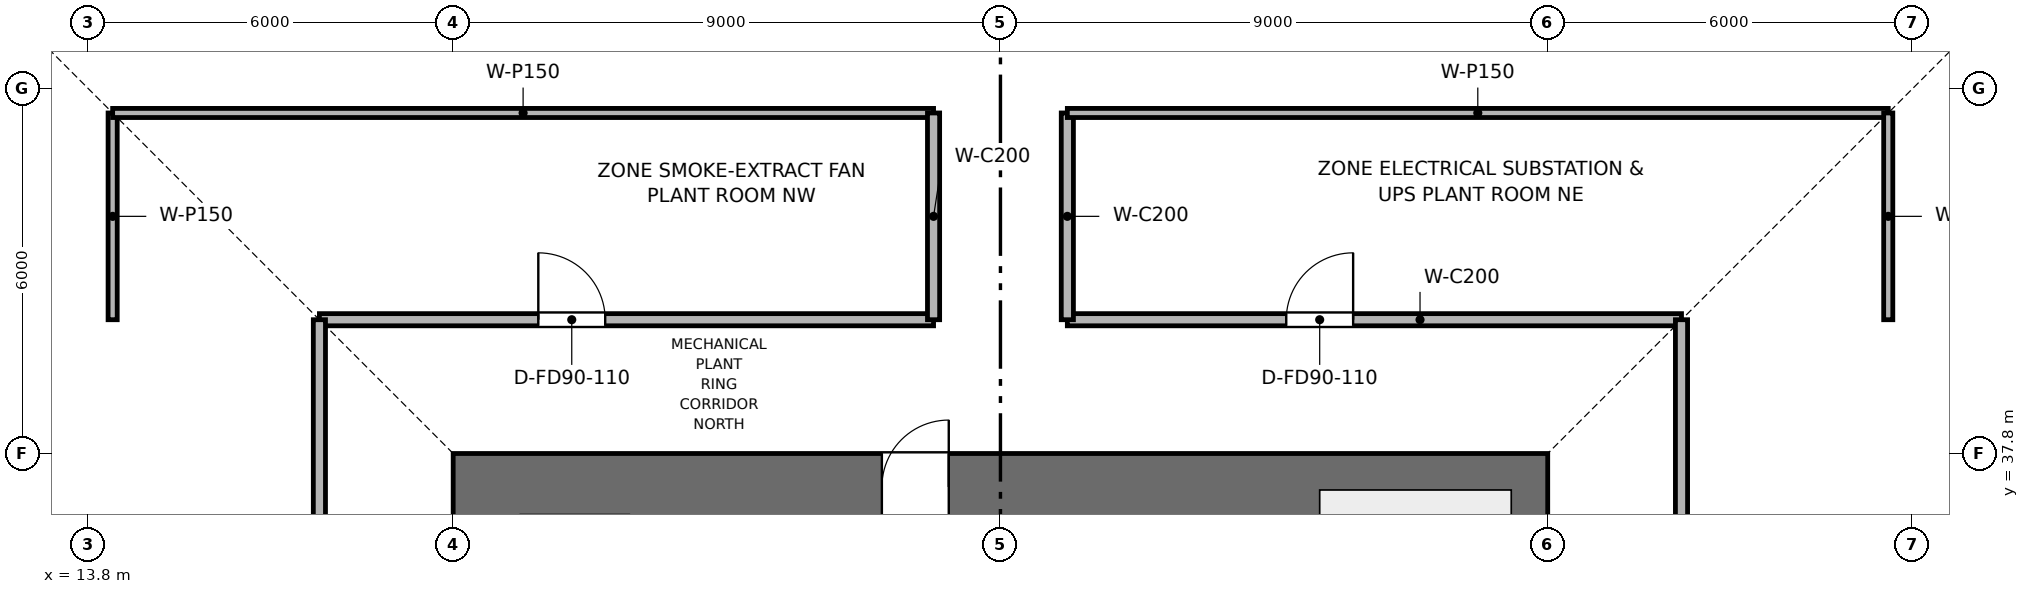
"""IFC4 building model, lengths in metres.
Left out: names, types, materials, properties, quantities, classifications, styles, units other than length and angle.
Written with IfcOpenShell. Run it as: python <this file> out.ifc"""

import sys

from ifc_helpers import new_model, si_unit, direction, frame, frame_2d, origin, place, context, subcontext, project, spatial, rectangle, extrude, element, fill, save


model = new_model("IFC4")
c1 = context("Model", 3, precision=1e-05, world=origin(), true_north=direction((0.0, 1.0)))
c2 = subcontext(c1, "Body", "Model", "MODEL_VIEW")
j1 = project(units=[si_unit("LENGTHUNIT", "METRE"), si_unit("PLANEANGLEUNIT", "RADIAN")], contexts=[c1])
p1 = place(None, origin())
s1 = spatial("IfcSite", under=j1, at=p1, CompositionType="ELEMENT")
p2 = place(p1, origin())
s2 = spatial("IfcBuilding", under=s1, at=p2, CompositionType="ELEMENT")
p3 = place(p2, frame((0.0, 0.0, 24.0)))
s3 = spatial("IfcBuildingStorey", under=s2, at=p3, CompositionType="ELEMENT", Elevation=24.0)
p4 = place(p3, frame((19.8, 37.25, 0.0), z_axis=(0.0, 0.0, 1.0), x_axis=(1.0, 0.0, 0.0)))
e1 = element("IfcWall", 1, at=p4, inside=s3, PredefinedType="SHEAR", context=c2, shape_type="SweptSolid", body=[
    extrude(rectangle(XDim=18.0, YDim=1.1, at=frame_2d((9.0, 0.0))), origin(), (0.0, 0.0, 1.0), 6.0),
])
p5 = place(p4, frame((7.05, 0.0, 0.0)))
e2 = element("IfcOpeningElement", 2, at=p5, cuts=e1, PredefinedType="OPENING", context=c2, shape_type="SweptSolid", body=[
    extrude(rectangle(XDim=1.1, YDim=2.15, at=frame_2d((0.55, 1.075))), frame((0.0, 0.56, 0.0), z_axis=(0.0, -1.0, 0.0), x_axis=(1.0, 0.0, 0.0)), (0.0, 0.0, 1.0), 1.12),
])
p6 = place(p3, frame((17.6, 40.0, 0.0), z_axis=(0.0, 0.0, 1.0), x_axis=(1.0, 0.0, 0.0)))
e3 = element("IfcWall", 3, at=p6, inside=s3, PredefinedType="PARTITIONING", context=c2, shape_type="SweptSolid", body=[
    extrude(rectangle(XDim=10.1, YDim=0.2, at=frame_2d((5.05, 0.0))), origin(), (0.0, 0.0, 1.0), 5.185),
])
p7 = place(p6, frame((3.6, 0.0, 0.0)))
e4 = element("IfcOpeningElement", 4, at=p7, cuts=e3, PredefinedType="OPENING", context=c2, shape_type="SweptSolid", body=[
    extrude(rectangle(XDim=1.1, YDim=2.15, at=frame_2d((0.55, 1.075))), frame((0.0, 0.11, 0.0), z_axis=(0.0, -1.0, 0.0), x_axis=(1.0, 0.0, 0.0)), (0.0, 0.0, 1.0), 0.22),
])
p8 = place(p3, frame((29.9, 40.0, 0.0), z_axis=(0.0, 0.0, 1.0), x_axis=(1.0, 0.0, 0.0)))
e5 = element("IfcWall", 5, at=p8, inside=s3, PredefinedType="PARTITIONING", context=c2, shape_type="SweptSolid", body=[
    extrude(rectangle(XDim=10.1, YDim=0.2, at=frame_2d((5.05, 0.0))), origin(), (0.0, 0.0, 1.0), 5.185),
])
p9 = place(p8, frame((3.6, 0.0, 0.0)))
e6 = element("IfcOpeningElement", 6, at=p9, cuts=e5, PredefinedType="OPENING", context=c2, shape_type="SweptSolid", body=[
    extrude(rectangle(XDim=1.1, YDim=2.15, at=frame_2d((0.55, 1.075))), frame((0.0, 0.11, 0.0), z_axis=(0.0, -1.0, 0.0), x_axis=(1.0, 0.0, 0.0)), (0.0, 0.0, 1.0), 0.22),
])
for number, where, z_axis, x_axis in (
    (7, (17.6, 29.9, 0.0), (0.0, 0.0, 1.0), (0.0, 1.0, 0.0)),
    (8, (40.0, 29.9, 0.0), (0.0, 0.0, 1.0), (0.0, 1.0, 0.0)),
):
    element("IfcWall", number, at=place(p3, frame(where, z_axis=z_axis, x_axis=x_axis)), inside=s3, PredefinedType="PARTITIONING", context=c2, shape_type="SweptSolid", body=[
        extrude(rectangle(XDim=10.1, YDim=0.2, at=frame_2d((5.05, 0.0))), origin(), (0.0, 0.0, 1.0), 5.185),
    ])
p10 = place(p3, frame((14.2, 40.0, 0.0), z_axis=(0.0, 0.0, 1.0), x_axis=(0.0, 1.0, 0.0)))
e9 = element("IfcWall", 9, at=p10, inside=s3, PredefinedType="PARTITIONING", context=c2, shape_type="SweptSolid", body=[
    extrude(rectangle(XDim=3.4, YDim=0.15, at=frame_2d((1.7, 0.0))), origin(), (0.0, 0.0, 1.0), 5.75),
])
p11 = place(p3, frame((14.2, 43.4, 0.0), z_axis=(0.0, 0.0, 1.0), x_axis=(1.0, 0.0, 0.0)))
e10 = element("IfcWall", 10, at=p11, inside=s3, PredefinedType="PARTITIONING", context=c2, shape_type="SweptSolid", body=[
    extrude(rectangle(XDim=13.5, YDim=0.15, at=frame_2d((6.75, 0.0))), origin(), (0.0, 0.0, 1.0), 5.185),
])
for number, where, z_axis, x_axis in (
    (11, (27.7, 40.0, 0.0), (0.0, 0.0, 1.0), (0.0, 1.0, 0.0)),
    (12, (29.9, 40.0, 0.0), (0.0, 0.0, 1.0), (0.0, 1.0, 0.0)),
):
    element("IfcWall", number, at=place(p3, frame(where, z_axis=z_axis, x_axis=x_axis)), inside=s3, PredefinedType="PARTITIONING", context=c2, shape_type="SweptSolid", body=[
        extrude(rectangle(XDim=3.4, YDim=0.2, at=frame_2d((1.7, 0.0))), origin(), (0.0, 0.0, 1.0), 5.75),
    ])
p12 = place(p3, frame((29.9, 43.4, 0.0), z_axis=(0.0, 0.0, 1.0), x_axis=(1.0, 0.0, 0.0)))
e13 = element("IfcWall", 13, at=p12, inside=s3, PredefinedType="PARTITIONING", context=c2, shape_type="SweptSolid", body=[
    extrude(rectangle(XDim=13.5, YDim=0.15, at=frame_2d((6.75, 0.0))), origin(), (0.0, 0.0, 1.0), 5.185),
])
p13 = place(p3, frame((43.4, 40.0, 0.0), z_axis=(0.0, 0.0, 1.0), x_axis=(0.0, 1.0, 0.0)))
e14 = element("IfcWall", 14, at=p13, inside=s3, PredefinedType="PARTITIONING", context=c2, shape_type="SweptSolid", body=[
    extrude(rectangle(XDim=3.4, YDim=0.15, at=frame_2d((1.7, 0.0))), origin(), (0.0, 0.0, 1.0), 5.75),
])
p14 = place(p7, origin())
e15 = element("IfcDoor", 15, at=p14, inside=s3, OperationType="SINGLE_SWING_LEFT", PredefinedType="DOOR", context=c2, shape_type="SweptSolid", body=[
    extrude(rectangle(XDim=1.1, YDim=2.15, at=frame_2d((0.55, 1.075))), frame((0.0, 0.025, 0.0), z_axis=(0.0, -1.0, 0.0), x_axis=(1.0, 0.0, 0.0)), (0.0, 0.0, 1.0), 0.05),
])
fill(e4, e15)
p15 = place(p9, origin())
e16 = element("IfcDoor", 16, at=p15, inside=s3, OperationType="SINGLE_SWING_RIGHT", PredefinedType="DOOR", context=c2, shape_type="SweptSolid", body=[
    extrude(rectangle(XDim=1.1, YDim=2.15, at=frame_2d((0.55, 1.075))), frame((0.0, 0.025, 0.0), z_axis=(0.0, -1.0, 0.0), x_axis=(1.0, 0.0, 0.0)), (0.0, 0.0, 1.0), 0.05),
])
fill(e6, e16)
p16 = place(p5, origin())
e17 = element("IfcDoor", 17, at=p16, inside=s3, OperationType="SINGLE_SWING_RIGHT", PredefinedType="DOOR", context=c2, shape_type="SweptSolid", body=[
    extrude(rectangle(XDim=1.1, YDim=2.15, at=frame_2d((0.55, 1.075))), frame((0.0, 0.025, 0.0), z_axis=(0.0, -1.0, 0.0), x_axis=(1.0, 0.0, 0.0)), (0.0, 0.0, 1.0), 0.05),
])
fill(e2, e17)
save(model, sys.argv[1])
